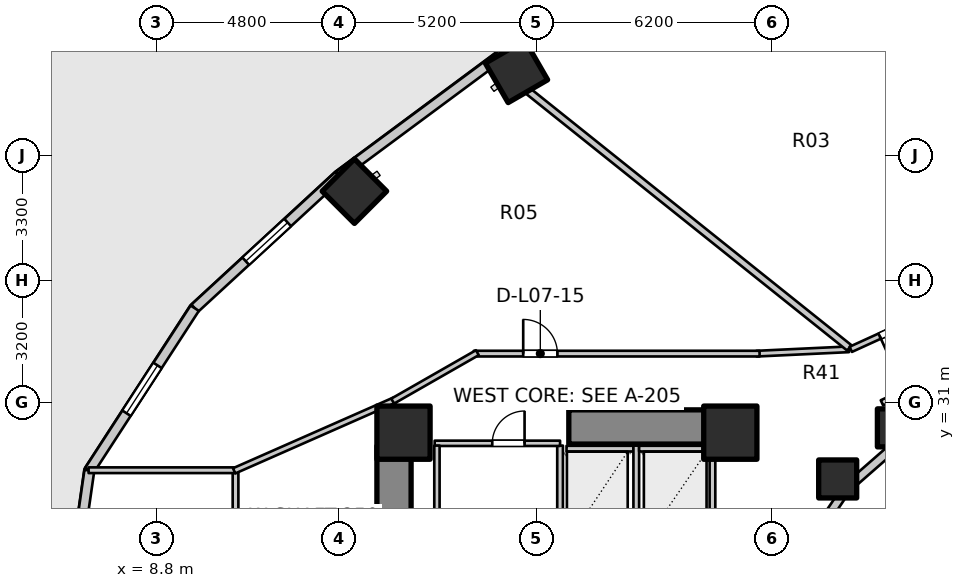
"""IFC4 building model, lengths in metres.
Left out: names, types, materials, properties, quantities, classifications, styles, units other than length and angle.
Written with IfcOpenShell. Run it as: python <this file> out.ifc"""

import sys

from ifc_helpers import new_model, si_unit, direction, frame, frame_2d, origin, origin_2d, place, context, subcontext, project, spatial, rectangle, extrude, element, fill, save


model = new_model("IFC4")
c1 = context("Model", 3, precision=1e-05, world=origin(), true_north=direction((0.0, 1.0)))
c2 = subcontext(c1, "Body", "Model", "MODEL_VIEW")
j1 = project(units=[si_unit("LENGTHUNIT", "METRE"), si_unit("PLANEANGLEUNIT", "RADIAN")], contexts=[c1])
p1 = place(None, origin())
s1 = spatial("IfcSite", under=j1, at=p1, CompositionType="ELEMENT")
p2 = place(p1, origin())
s2 = spatial("IfcBuilding", under=s1, at=p2, CompositionType="ELEMENT")
p3 = place(p2, frame((0.0, 0.0, 27.6)))
s3 = spatial("IfcBuildingStorey", under=s2, at=p3, CompositionType="ELEMENT", Elevation=27.6)
p4 = place(p3, frame((15.05, 17.05, 0.0), z_axis=(0.0, 0.0, 1.0), x_axis=(0.0, 1.0, 0.0)))
e1 = element("IfcWall", 1, at=p4, inside=s3, PredefinedType="SHEAR", context=c2, shape_type="SweptSolid", body=[
    extrude(rectangle(XDim=12.8, YDim=0.9, at=frame_2d((6.4, 0.0))), origin(), (0.0, 0.0, 1.0), 3.1),
])
p5 = place(p3, frame((19.65, 30.35, 0.0), z_axis=(0.0, 0.0, 1.0), x_axis=(1.0, 0.0, 0.0)))
e2 = element("IfcWall", 2, at=p5, inside=s3, PredefinedType="SHEAR", context=c2, shape_type="SweptSolid", body=[
    extrude(rectangle(XDim=4.5, YDim=0.9, at=frame_2d((2.25, 0.0))), origin(), (0.0, 0.0, 1.0), 3.1),
])
for number, where, z_axis, x_axis in (
    (3, (23.9, 30.2, 0.0), (0.0, 0.0, 1.0), (1.0, 0.0, 0.0)),
    (4, (15.3, 30.2, 0.0), (0.0, 0.0, 1.0), (1.0, 0.0, 0.0)),
):
    element("IfcColumn", number, at=place(p3, frame(where, z_axis=z_axis, x_axis=x_axis)), inside=s3, PredefinedType="COLUMN", context=c2, shape_type="SweptSolid", body=[
        extrude(rectangle(XDim=1.4, YDim=1.4, at=origin_2d()), origin(), (0.0, 0.0, 1.0), 3.1),
    ])
p6 = place(p3, frame((28.27, 30.327, 0.0), z_axis=(0.0, 0.0, 1.0), x_axis=(1.0, 0.0, 0.0)))
e5 = element("IfcColumn", 5, at=p6, inside=s3, PredefinedType="COLUMN", context=c2, shape_type="SweptSolid", body=[
    extrude(rectangle(XDim=1.0, YDim=1.0, at=origin_2d()), origin(), (0.0, 0.0, 1.0), 3.1),
])
p7 = place(p3, frame((18.273, 39.704, 0.0), z_axis=(0.0, 0.0, 1.0), x_axis=(-0.5, 0.866025403784, 0.0)))
e6 = element("IfcColumn", 6, at=p7, inside=s3, PredefinedType="COLUMN", context=c2, shape_type="SweptSolid", body=[
    extrude(rectangle(XDim=1.2, YDim=1.2, at=origin_2d()), origin(), (0.0, 0.0, 1.0), 3.1),
])
p8 = place(p3, frame((26.725, 28.982, 0.0), z_axis=(0.0, 0.0, 1.0), x_axis=(1.0, 0.0, 0.0)))
e7 = element("IfcColumn", 7, at=p8, inside=s3, PredefinedType="COLUMN", context=c2, shape_type="SweptSolid", body=[
    extrude(rectangle(XDim=1.0, YDim=1.0, at=origin_2d()), origin(), (0.0, 0.0, 1.0), 3.1),
])
p9 = place(p3, frame((14.008, 36.554, 0.0), z_axis=(0.0, 0.0, 1.0), x_axis=(-0.707106781187, 0.707106781187, 0.0)))
e8 = element("IfcColumn", 8, at=p9, inside=s3, PredefinedType="COLUMN", context=c2, shape_type="SweptSolid", body=[
    extrude(rectangle(XDim=1.2, YDim=1.2, at=origin_2d()), origin(), (0.0, 0.0, 1.0), 3.1),
])
p10 = place(p3, frame((28.44, 30.032, 0.0), z_axis=(0.0, 0.0, 1.0), x_axis=(-0.752576694707, -0.658504607869, 0.0)))
e9 = element("IfcWall", 9, at=p10, inside=s3, PredefinedType="STANDARD", context=c2, shape_type="SweptSolid", body=[
    extrude(rectangle(XDim=1.959, YDim=0.23, at=frame_2d((0.98, 0.0))), origin(), (0.0, 0.0, 1.0), 2.16),
])
p11 = place(p3, frame((26.965, 28.742, 0.0), z_axis=(0.0, 0.0, 1.0), x_axis=(-0.558197800898, -0.829707909492, 0.0)))
e10 = element("IfcWall", 10, at=p11, inside=s3, PredefinedType="STANDARD", context=c2, shape_type="SweptSolid", body=[
    extrude(rectangle(XDim=2.027, YDim=0.23, at=frame_2d((1.013, 0.0))), origin(), (0.0, 0.0, 1.0), 2.16),
])
p12 = place(p3, frame((23.668, 42.636, 0.0), z_axis=(0.0, 0.0, 1.0), x_axis=(-0.919612132394, -0.39282760335, 0.0)))
e11 = element("IfcWall", 11, at=p12, inside=s3, PredefinedType="STANDARD", context=c2, shape_type="SweptSolid", body=[
    extrude(rectangle(XDim=6.209, YDim=0.26, at=frame_2d((3.105, 0.0))), origin(), (0.0, 0.0, 1.0), 2.85),
])
p13 = place(p12, frame((2.355, 0.0, 0.75)))
e12 = element("IfcOpeningElement", 12, at=p13, cuts=e11, PredefinedType="OPENING", context=c2, shape_type="SweptSolid", body=[
    extrude(rectangle(XDim=1.5, YDim=1.6, at=frame_2d((0.75, 0.8))), frame((0.0, 0.14, 0.0), z_axis=(0.0, -1.0, 0.0), x_axis=(1.0, 0.0, 0.0)), (0.0, 0.0, 1.0), 0.28),
])
p14 = place(p3, frame((17.958, 40.197, 0.0), z_axis=(0.0, 0.0, 1.0), x_axis=(-0.803477531792, -0.595335078679, 0.0)))
e13 = element("IfcWall", 13, at=p14, inside=s3, PredefinedType="STANDARD", context=c2, shape_type="SweptSolid", body=[
    extrude(rectangle(XDim=5.43, YDim=0.26, at=frame_2d((2.715, 0.0))), origin(), (0.0, 0.0, 1.0), 2.85),
])
p15 = place(p3, frame((13.595, 36.965, 0.0), z_axis=(0.0, 0.0, 1.0), x_axis=(-0.735655109293, -0.67735630223, 0.0)))
e14 = element("IfcWall", 14, at=p15, inside=s3, PredefinedType="STANDARD", context=c2, shape_type="SweptSolid", body=[
    extrude(rectangle(XDim=5.151, YDim=0.26, at=frame_2d((2.575, 0.0))), origin(), (0.0, 0.0, 1.0), 2.85),
])
p16 = place(p15, frame((1.825, 0.0, 0.75)))
e15 = element("IfcOpeningElement", 15, at=p16, cuts=e14, PredefinedType="OPENING", context=c2, shape_type="SweptSolid", body=[
    extrude(rectangle(XDim=1.5, YDim=1.6, at=frame_2d((0.75, 0.8))), frame((0.0, 0.14, 0.0), z_axis=(0.0, -1.0, 0.0), x_axis=(1.0, 0.0, 0.0)), (0.0, 0.0, 1.0), 0.28),
])
p17 = place(p3, frame((9.806, 33.476, 0.0), z_axis=(0.0, 0.0, 1.0), x_axis=(-0.544578722263, -0.838709732421, 0.0)))
e16 = element("IfcWall", 16, at=p17, inside=s3, PredefinedType="STANDARD", context=c2, shape_type="SweptSolid", body=[
    extrude(rectangle(XDim=5.092, YDim=0.26, at=frame_2d((2.546, 0.0))), origin(), (0.0, 0.0, 1.0), 2.85),
])
p18 = place(p17, frame((1.796, 0.0, 0.75)))
e17 = element("IfcOpeningElement", 17, at=p18, cuts=e16, PredefinedType="OPENING", context=c2, shape_type="SweptSolid", body=[
    extrude(rectangle(XDim=1.5, YDim=1.6, at=frame_2d((0.75, 0.8))), frame((0.0, 0.14, 0.0), z_axis=(0.0, -1.0, 0.0), x_axis=(1.0, 0.0, 0.0)), (0.0, 0.0, 1.0), 0.28),
])
p19 = place(p3, frame((7.033, 29.205, 0.0), z_axis=(0.0, 0.0, 1.0), x_axis=(-0.142528001686, -0.989790770181, 0.0)))
e18 = element("IfcWall", 18, at=p19, inside=s3, PredefinedType="STANDARD", context=c2, shape_type="SweptSolid", body=[
    extrude(rectangle(XDim=6.269, YDim=0.26, at=frame_2d((3.135, 0.0))), origin(), (0.0, 0.0, 1.0), 2.85),
])
p20 = place(p19, frame((1.935, 0.0, 0.75)))
e19 = element("IfcOpeningElement", 19, at=p20, cuts=e18, PredefinedType="OPENING", context=c2, shape_type="SweptSolid", body=[
    extrude(rectangle(XDim=2.4, YDim=1.7, at=frame_2d((1.2, 0.85))), frame((0.0, 0.14, 0.0), z_axis=(0.0, -1.0, 0.0), x_axis=(1.0, 0.0, 0.0)), (0.0, 0.0, 1.0), 0.28),
])
p21 = place(p3, frame((19.59, 29.78, 0.0), z_axis=(0.0, 0.0, 1.0), x_axis=(1.0, 0.0, 0.0)))
e20 = element("IfcWall", 20, at=p21, inside=s3, PredefinedType="SOLIDWALL", context=c2, shape_type="SweptSolid", body=[
    extrude(rectangle(XDim=1.76, YDim=0.15, at=frame_2d((0.88, 0.0))), origin(), (0.0, 0.0, 1.0), 2.855),
])
for number, where, z_axis, x_axis in (
    (21, (19.42, 27.14, 0.0), (0.0, 0.0, 1.0), (0.0, 1.0, 0.0)),
    (22, (21.425, 27.14, 0.0), (0.0, 0.0, 1.0), (0.0, 1.0, 0.0)),
):
    element("IfcWall", number, at=place(p3, frame(where, z_axis=z_axis, x_axis=x_axis)), inside=s3, PredefinedType="SOLIDWALL", context=c2, shape_type="SweptSolid", body=[
        extrude(rectangle(XDim=2.72, YDim=0.15, at=frame_2d((1.36, 0.0))), origin(), (0.0, 0.0, 1.0), 2.855),
    ])
p22 = place(p3, frame((21.5, 29.78, 0.0), z_axis=(0.0, 0.0, 1.0), x_axis=(1.0, 0.0, 0.0)))
e23 = element("IfcWall", 23, at=p22, inside=s3, PredefinedType="SOLIDWALL", context=c2, shape_type="SweptSolid", body=[
    extrude(rectangle(XDim=1.76, YDim=0.15, at=frame_2d((0.88, 0.0))), origin(), (0.0, 0.0, 1.0), 2.855),
])
p23 = place(p3, frame((23.43, 27.14, 0.0), z_axis=(0.0, 0.0, 1.0), x_axis=(0.0, 1.0, 0.0)))
e24 = element("IfcWall", 24, at=p23, inside=s3, PredefinedType="SOLIDWALL", context=c2, shape_type="SweptSolid", body=[
    extrude(rectangle(XDim=2.72, YDim=0.15, at=frame_2d((1.36, 0.0))), origin(), (0.0, 0.0, 1.0), 2.855),
])
p24 = place(p3, frame((16.12, 29.92, 0.0), z_axis=(0.0, 0.0, 1.0), x_axis=(1.0, 0.0, 0.0)))
e25 = element("IfcWall", 25, at=p24, inside=s3, PredefinedType="PLUMBINGWALL", context=c2, shape_type="SweptSolid", body=[
    extrude(rectangle(XDim=3.3, YDim=0.14, at=frame_2d((1.65, 0.0))), origin(), (0.0, 0.0, 1.0), 2.855),
])
p25 = place(p24, frame((1.516, 0.0, 0.0)))
e26 = element("IfcOpeningElement", 26, at=p25, cuts=e25, PredefinedType="OPENING", context=c2, shape_type="SweptSolid", body=[
    extrude(rectangle(XDim=0.85, YDim=2.05, at=frame_2d((0.425, 1.025))), frame((0.0, 0.08, 0.0), z_axis=(0.0, -1.0, 0.0), x_axis=(1.0, 0.0, 0.0)), (0.0, 0.0, 1.0), 0.16),
])
p26 = place(p3, frame((16.18, 25.98, 0.0), z_axis=(0.0, 0.0, 1.0), x_axis=(0.0, 1.0, 0.0)))
e27 = element("IfcWall", 27, at=p26, inside=s3, PredefinedType="PLUMBINGWALL", context=c2, shape_type="SweptSolid", body=[
    extrude(rectangle(XDim=3.88, YDim=0.14, at=frame_2d((1.94, 0.0))), origin(), (0.0, 0.0, 1.0), 2.855),
])
p27 = place(p3, frame((29.873, 31.906, 0.0), z_axis=(0.0, 0.0, 1.0), x_axis=(-0.906943449489, -0.421252393975, 0.0)))
e28 = element("IfcWall", 28, at=p27, inside=s3, PredefinedType="PARTITIONING", context=c2, shape_type="SweptSolid", body=[
    extrude(rectangle(XDim=2.186, YDim=0.15, at=frame_2d((1.093, 0.0))), origin(), (0.0, 0.0, 1.0), 2.237),
])
p28 = place(p3, frame((10.88, 16.748, 0.0), z_axis=(0.0, 0.0, 1.0), x_axis=(0.0, 1.0, 0.0)))
e29 = element("IfcWall", 29, at=p28, inside=s3, PredefinedType="PARTITIONING", context=c2, shape_type="SweptSolid", body=[
    extrude(rectangle(XDim=12.503, YDim=0.15, at=frame_2d((6.252, 0.0))), origin(), (0.0, 0.0, 1.0), 2.12),
])
p29 = place(p3, frame((7.014, 29.212, 0.0), z_axis=(0.0, 0.0, 1.0), x_axis=(1.0, 0.0, 0.0)))
e30 = element("IfcWall", 30, at=p29, inside=s3, PredefinedType="PARTITIONING", context=c2, shape_type="SweptSolid", body=[
    extrude(rectangle(XDim=3.866, YDim=0.15, at=frame_2d((1.933, 0.0))), origin(), (0.0, 0.0, 1.0), 2.855),
])
p30 = place(p3, frame((10.844, 29.196, 0.0), z_axis=(0.0, 0.0, 1.0), x_axis=(0.91502756289, 0.403391322604, 0.0)))
e31 = element("IfcWall", 31, at=p30, inside=s3, PredefinedType="PARTITIONING", context=c2, shape_type="SweptSolid", body=[
    extrude(rectangle(XDim=4.637, YDim=0.15, at=frame_2d((2.319, 0.0))), origin(), (0.0, 0.0, 1.0), 2.069),
])
p31 = place(p3, frame((27.02, 32.394, 0.0), z_axis=(0.0, 0.0, 1.0), x_axis=(-0.998877427952, -0.047369651964, 0.0)))
e32 = element("IfcWall", 32, at=p31, inside=s3, PredefinedType="PARTITIONING", context=c2, shape_type="SweptSolid", body=[
    extrude(rectangle(XDim=2.433, YDim=0.15, at=frame_2d((1.216, 0.0))), origin(), (0.0, 0.0, 1.0), 2.237),
])
p32 = place(p3, frame((17.15, 32.28, 0.0), z_axis=(0.0, 0.0, 1.0), x_axis=(1.0, 0.0, 0.0)))
e33 = element("IfcWall", 33, at=p32, inside=s3, PredefinedType="PARTITIONING", context=c2, shape_type="SweptSolid", body=[
    extrude(rectangle(XDim=7.52, YDim=0.15, at=frame_2d((3.76, 0.0))), origin(), (0.0, 0.0, 1.0), 2.237),
])
p33 = place(p32, frame((1.3, 0.0, 0.0)))
e34 = element("IfcOpeningElement", 34, at=p33, cuts=e33, PredefinedType="OPENING", context=c2, shape_type="SweptSolid", body=[
    extrude(rectangle(XDim=0.9, YDim=2.1, at=frame_2d((0.45, 1.05))), frame((0.0, 0.085, 0.0), z_axis=(0.0, -1.0, 0.0), x_axis=(1.0, 0.0, 0.0)), (0.0, 0.0, 1.0), 0.17),
])
p34 = place(p3, frame((17.243, 32.305, 0.0), z_axis=(0.0, 0.0, 1.0), x_axis=(-0.867991349648, -0.496579315857, 0.0)))
e35 = element("IfcWall", 35, at=p34, inside=s3, PredefinedType="PARTITIONING", context=c2, shape_type="SweptSolid", body=[
    extrude(rectangle(XDim=2.567, YDim=0.15, at=frame_2d((1.283, 0.0))), origin(), (0.0, 0.0, 1.0), 2.069),
])
p35 = place(p3, frame((27.032, 32.431, 0.0), z_axis=(0.0, 0.0, 1.0), x_axis=(-0.781055486744, 0.624461629428, 0.0)))
e36 = element("IfcWall", 36, at=p35, inside=s3, PredefinedType="PARTITIONING", context=c2, shape_type="SweptSolid", body=[
    extrude(rectangle(XDim=10.843, YDim=0.18, at=frame_2d((5.422, 0.0))), origin(), (0.0, 0.0, 1.0), 2.237),
])
p36 = place(p3, frame((29.457, 33.482, 0.0), z_axis=(0.0, 0.0, 1.0), x_axis=(-0.909747571199, -0.415161843982, 0.0)))
e37 = element("IfcWall", 37, at=p36, inside=s3, PredefinedType="PARTITIONING", context=c2, shape_type="SweptSolid", body=[
    extrude(rectangle(XDim=2.625, YDim=0.15, at=frame_2d((1.312, 0.0))), origin(), (0.0, 0.0, 1.0), 2.237),
])
p37 = place(p36, frame((0.838, 0.0, 0.0)))
e38 = element("IfcOpeningElement", 38, at=p37, cuts=e37, PredefinedType="OPENING", context=c2, shape_type="SweptSolid", body=[
    extrude(rectangle(XDim=0.95, YDim=2.1, at=frame_2d((0.475, 1.05))), frame((0.0, 0.085, 0.0), z_axis=(0.0, -1.0, 0.0), x_axis=(1.0, 0.0, 0.0)), (0.0, 0.0, 1.0), 0.17),
])
p38 = place(p16, origin())
e39 = element("IfcWindow", 39, at=p38, inside=s3, PartitioningType="SINGLE_PANEL", PredefinedType="WINDOW", context=c2, shape_type="SweptSolid", body=[
    extrude(rectangle(XDim=1.5, YDim=1.6, at=frame_2d((0.75, 0.8))), frame((0.0, 0.03, 0.0), z_axis=(0.0, -1.0, 0.0), x_axis=(1.0, 0.0, 0.0)), (0.0, 0.0, 1.0), 0.06),
])
fill(e15, e39)
p39 = place(p18, origin())
e40 = element("IfcWindow", 40, at=p39, inside=s3, PartitioningType="SINGLE_PANEL", PredefinedType="WINDOW", context=c2, shape_type="SweptSolid", body=[
    extrude(rectangle(XDim=1.5, YDim=1.6, at=frame_2d((0.75, 0.8))), frame((0.0, 0.03, 0.0), z_axis=(0.0, -1.0, 0.0), x_axis=(1.0, 0.0, 0.0)), (0.0, 0.0, 1.0), 0.06),
])
fill(e17, e40)
p40 = place(p25, origin())
e41 = element("IfcDoor", 41, at=p40, inside=s3, OperationType="SINGLE_SWING_RIGHT", PredefinedType="DOOR", context=c2, shape_type="SweptSolid", body=[
    extrude(rectangle(XDim=0.85, YDim=2.05, at=frame_2d((0.425, 1.025))), frame((0.0, 0.025, 0.0), z_axis=(0.0, -1.0, 0.0), x_axis=(1.0, 0.0, 0.0)), (0.0, 0.0, 1.0), 0.05),
])
fill(e26, e41)
p41 = place(p33, origin())
e42 = element("IfcDoor", 42, at=p41, inside=s3, OperationType="SINGLE_SWING_LEFT", PredefinedType="DOOR", context=c2, shape_type="SweptSolid", body=[
    extrude(rectangle(XDim=0.9, YDim=2.1, at=frame_2d((0.45, 1.05))), frame((0.0, 0.025, 0.0), z_axis=(0.0, -1.0, 0.0), x_axis=(1.0, 0.0, 0.0)), (0.0, 0.0, 1.0), 0.05),
])
fill(e34, e42)
p42 = place(p37, origin())
e43 = element("IfcDoor", 43, at=p42, inside=s3, OperationType="SINGLE_SWING_RIGHT", PredefinedType="DOOR", context=c2, shape_type="SweptSolid", body=[
    extrude(rectangle(XDim=0.95, YDim=2.1, at=frame_2d((0.475, 1.05))), frame((0.0, 0.025, 0.0), z_axis=(0.0, -1.0, 0.0), x_axis=(1.0, 0.0, 0.0)), (0.0, 0.0, 1.0), 0.05),
])
fill(e38, e43)
save(model, sys.argv[1])
